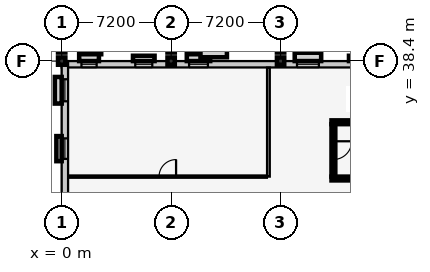
"""IFC4 building model, lengths in metres.
Left out: names, types, materials, properties, quantities, classifications, styles, units other than length and angle.
Written with IfcOpenShell. Run it as: python <this file> out.ifc"""

import sys

from ifc_helpers import new_model, si_unit, direction, frame, frame_2d, origin, origin_2d, place, context, subcontext, project, spatial, rectangle, extrude, element, fill, save


model = new_model("IFC4")
c1 = context("Model", 3, precision=1e-05, world=origin(), true_north=direction((0.0, 1.0)))
c2 = subcontext(c1, "Body", "Model", "MODEL_VIEW")
j1 = project(units=[si_unit("LENGTHUNIT", "METRE"), si_unit("PLANEANGLEUNIT", "RADIAN")], contexts=[c1])
p1 = place(None, origin())
s1 = spatial("IfcSite", under=j1, at=p1, CompositionType="ELEMENT")
p2 = place(p1, origin())
s2 = spatial("IfcBuilding", under=s1, at=p2, CompositionType="ELEMENT")
p3 = place(p2, frame((0.0, 0.0, 9.6)))
s3 = spatial("IfcBuildingStorey", under=s2, at=p3, CompositionType="ELEMENT", Elevation=9.6)
for number, where, z_axis, x_axis in (
    (1, (0.0, 38.4, 0.0), (0.0, 0.0, 1.0), (1.0, 0.0, 0.0)),
    (2, (7.2, 38.4, 0.0), (0.0, 0.0, 1.0), (1.0, 0.0, 0.0)),
    (3, (14.4, 38.4, 0.0), (0.0, 0.0, 1.0), (1.0, 0.0, 0.0)),
    (4, (0.0, 39.2, 0.0), (0.0, 0.0, 1.0), (1.0, 0.0, 0.0)),
    (5, (7.2, 39.2, 0.0), (0.0, 0.0, 1.0), (1.0, 0.0, 0.0)),
    (6, (14.4, 39.2, 0.0), (0.0, 0.0, 1.0), (1.0, 0.0, 0.0)),
):
    element("IfcColumn", number, at=place(p3, frame(where, z_axis=z_axis, x_axis=x_axis)), inside=s3, PredefinedType="COLUMN", context=c2, shape_type="SweptSolid", body=[
        extrude(rectangle(XDim=0.48, YDim=0.48, at=origin_2d()), origin(), (0.0, 0.0, 1.0), 4.2),
    ])
p4 = place(p3, frame((0.0, 38.19, 0.0), z_axis=(0.0, 0.0, 1.0), x_axis=(1.0, 0.0, 0.0)))
e7 = element("IfcWall", 7, at=p4, inside=s3, PredefinedType="SOLIDWALL", context=c2, shape_type="SweptSolid", body=[
    extrude(rectangle(XDim=57.6, YDim=0.42, at=frame_2d((28.8, 0.0))), origin(), (0.0, 0.0, 1.0), 3.675),
])
p5 = place(p4, frame((1.3, 0.0, 0.9)))
e8 = element("IfcOpeningElement", 8, at=p5, cuts=e7, PredefinedType="OPENING", context=c2, shape_type="SweptSolid", body=[
    extrude(rectangle(XDim=1.0, YDim=1.75, at=frame_2d((0.5, 0.875))), frame((0.0, 0.222, 0.0), z_axis=(0.0, -1.0, 0.0), x_axis=(1.0, 0.0, 0.0)), (0.0, 0.0, 1.0), 0.444),
])
p6 = place(p4, frame((4.84, 0.0, 0.9)))
e9 = element("IfcOpeningElement", 9, at=p6, cuts=e7, PredefinedType="OPENING", context=c2, shape_type="SweptSolid", body=[
    extrude(rectangle(XDim=1.12, YDim=1.75, at=frame_2d((0.56, 0.875))), frame((0.0, 0.222, 0.0), z_axis=(0.0, -1.0, 0.0), x_axis=(1.0, 0.0, 0.0)), (0.0, 0.0, 1.0), 0.444),
])
p7 = place(p4, frame((8.38, 0.0, 0.9)))
e10 = element("IfcOpeningElement", 10, at=p7, cuts=e7, PredefinedType="OPENING", context=c2, shape_type="SweptSolid", body=[
    extrude(rectangle(XDim=1.24, YDim=1.75, at=frame_2d((0.62, 0.875))), frame((0.0, 0.222, 0.0), z_axis=(0.0, -1.0, 0.0), x_axis=(1.0, 0.0, 0.0)), (0.0, 0.0, 1.0), 0.444),
])
p8 = place(p4, frame((15.48, 0.0, 0.9)))
e11 = element("IfcOpeningElement", 11, at=p8, cuts=e7, PredefinedType="OPENING", context=c2, shape_type="SweptSolid", body=[
    extrude(rectangle(XDim=1.44, YDim=1.75, at=frame_2d((0.72, 0.875))), frame((0.0, 0.222, 0.0), z_axis=(0.0, -1.0, 0.0), x_axis=(1.0, 0.0, 0.0)), (0.0, 0.0, 1.0), 0.444),
])
p9 = place(p4, frame((19.05, 0.0, 0.9)))
e12 = element("IfcOpeningElement", 12, at=p9, cuts=e7, PredefinedType="OPENING", context=c2, shape_type="SweptSolid", body=[
    extrude(rectangle(XDim=1.5, YDim=1.75, at=frame_2d((0.75, 0.875))), frame((0.0, 0.222, 0.0), z_axis=(0.0, -1.0, 0.0), x_axis=(1.0, 0.0, 0.0)), (0.0, 0.0, 1.0), 0.444),
])
p10 = place(p4, frame((22.95, 0.0, 0.9)))
e13 = element("IfcOpeningElement", 13, at=p10, cuts=e7, PredefinedType="OPENING", context=c2, shape_type="SweptSolid", body=[
    extrude(rectangle(XDim=0.9, YDim=1.35, at=frame_2d((0.45, 0.675))), frame((0.0, 0.222, 0.0), z_axis=(0.0, -1.0, 0.0), x_axis=(1.0, 0.0, 0.0)), (0.0, 0.0, 1.0), 0.444),
])
p11 = place(p4, frame((30.05, 0.0, 0.9)))
e14 = element("IfcOpeningElement", 14, at=p11, cuts=e7, PredefinedType="OPENING", context=c2, shape_type="SweptSolid", body=[
    extrude(rectangle(XDim=1.1, YDim=1.35, at=frame_2d((0.55, 0.675))), frame((0.0, 0.222, 0.0), z_axis=(0.0, -1.0, 0.0), x_axis=(1.0, 0.0, 0.0)), (0.0, 0.0, 1.0), 0.444),
])
p12 = place(p4, frame((33.6, 0.0, 0.9)))
e15 = element("IfcOpeningElement", 15, at=p12, cuts=e7, PredefinedType="OPENING", context=c2, shape_type="SweptSolid", body=[
    extrude(rectangle(XDim=1.2, YDim=1.35, at=frame_2d((0.6, 0.675))), frame((0.0, 0.222, 0.0), z_axis=(0.0, -1.0, 0.0), x_axis=(1.0, 0.0, 0.0)), (0.0, 0.0, 1.0), 0.444),
])
p13 = place(p4, frame((37.15, 0.0, 0.9)))
e16 = element("IfcOpeningElement", 16, at=p13, cuts=e7, PredefinedType="OPENING", context=c2, shape_type="SweptSolid", body=[
    extrude(rectangle(XDim=1.3, YDim=1.35, at=frame_2d((0.65, 0.675))), frame((0.0, 0.222, 0.0), z_axis=(0.0, -1.0, 0.0), x_axis=(1.0, 0.0, 0.0)), (0.0, 0.0, 1.0), 0.444),
])
p14 = place(p4, frame((40.7, 0.0, 0.9)))
e17 = element("IfcOpeningElement", 17, at=p14, cuts=e7, PredefinedType="OPENING", context=c2, shape_type="SweptSolid", body=[
    extrude(rectangle(XDim=1.4, YDim=1.35, at=frame_2d((0.7, 0.675))), frame((0.0, 0.222, 0.0), z_axis=(0.0, -1.0, 0.0), x_axis=(1.0, 0.0, 0.0)), (0.0, 0.0, 1.0), 0.444),
])
p15 = place(p4, frame((44.525, 0.0, 0.9)))
e18 = element("IfcOpeningElement", 18, at=p15, cuts=e7, PredefinedType="OPENING", context=c2, shape_type="SweptSolid", body=[
    extrude(rectangle(XDim=0.95, YDim=1.45, at=frame_2d((0.475, 0.725))), frame((0.0, 0.222, 0.0), z_axis=(0.0, -1.0, 0.0), x_axis=(1.0, 0.0, 0.0)), (0.0, 0.0, 1.0), 0.444),
])
p16 = place(p4, frame((51.625, 0.0, 0.9)))
e19 = element("IfcOpeningElement", 19, at=p16, cuts=e7, PredefinedType="OPENING", context=c2, shape_type="SweptSolid", body=[
    extrude(rectangle(XDim=1.15, YDim=1.45, at=frame_2d((0.575, 0.725))), frame((0.0, 0.222, 0.0), z_axis=(0.0, -1.0, 0.0), x_axis=(1.0, 0.0, 0.0)), (0.0, 0.0, 1.0), 0.444),
])
p17 = place(p4, frame((55.175, 0.0, 0.9)))
e20 = element("IfcOpeningElement", 20, at=p17, cuts=e7, PredefinedType="OPENING", context=c2, shape_type="SweptSolid", body=[
    extrude(rectangle(XDim=1.25, YDim=1.45, at=frame_2d((0.625, 0.725))), frame((0.0, 0.222, 0.0), z_axis=(0.0, -1.0, 0.0), x_axis=(1.0, 0.0, 0.0)), (0.0, 0.0, 1.0), 0.444),
])
p18 = place(p3, frame((0.21, 0.0, 0.0), z_axis=(0.0, 0.0, 1.0), x_axis=(0.0, 1.0, 0.0)))
e21 = element("IfcWall", 21, at=p18, inside=s3, PredefinedType="SOLIDWALL", context=c2, shape_type="SweptSolid", body=[
    extrude(rectangle(XDim=38.4, YDim=0.42, at=frame_2d((19.2, 0.0))), origin(), (0.0, 0.0, 1.0), 3.825),
])
p19 = place(p18, frame((31.965, 0.0, 0.9)))
e22 = element("IfcOpeningElement", 22, at=p19, cuts=e21, PredefinedType="OPENING", context=c2, shape_type="SweptSolid", body=[
    extrude(rectangle(XDim=1.35, YDim=1.45, at=frame_2d((0.675, 0.725))), frame((0.0, 0.222, 0.0), z_axis=(0.0, -1.0, 0.0), x_axis=(1.0, 0.0, 0.0)), (0.0, 0.0, 1.0), 0.444),
])
p20 = place(p18, frame((35.755, 0.0, 0.9)))
e23 = element("IfcOpeningElement", 23, at=p20, cuts=e21, PredefinedType="OPENING", context=c2, shape_type="SweptSolid", body=[
    extrude(rectangle(XDim=1.45, YDim=1.45, at=frame_2d((0.725, 0.725))), frame((0.0, 0.222, 0.0), z_axis=(0.0, -1.0, 0.0), x_axis=(1.0, 0.0, 0.0)), (0.0, 0.0, 1.0), 0.444),
])
for number, where, z_axis, x_axis in (
    (24, (17.75, 30.675, 0.0), (0.0, 0.0, 1.0), (1.0, 0.0, 0.0)),
    (25, (26.65, 34.375, 0.0), (0.0, 0.0, 1.0), (-1.0, 0.0, 0.0)),
):
    element("IfcWall", number, at=place(p3, frame(where, z_axis=z_axis, x_axis=x_axis)), inside=s3, PredefinedType="SHEAR", context=c2, shape_type="SweptSolid", body=[
        extrude(rectangle(XDim=8.9, YDim=0.25, at=frame_2d((4.45, 0.0))), origin(), (0.0, 0.0, 1.0), 3.95),
    ])
p21 = place(p3, frame((17.875, 34.25, 0.0), z_axis=(0.0, 0.0, 1.0), x_axis=(0.0, -1.0, 0.0)))
e26 = element("IfcWall", 26, at=p21, inside=s3, PredefinedType="SHEAR", context=c2, shape_type="SweptSolid", body=[
    extrude(rectangle(XDim=3.45, YDim=0.25, at=frame_2d((1.725, 0.0))), origin(), (0.0, 0.0, 1.0), 3.95),
])
p22 = place(p21, frame((1.125, 0.0, 0.0)))
e27 = element("IfcOpeningElement", 27, at=p22, cuts=e26, PredefinedType="OPENING", context=c2, shape_type="SweptSolid", body=[
    extrude(rectangle(XDim=1.2, YDim=2.15, at=frame_2d((0.6, 1.075))), frame((0.0, 0.137, 0.0), z_axis=(0.0, -1.0, 0.0), x_axis=(1.0, 0.0, 0.0)), (0.0, 0.0, 1.0), 0.274),
])
p23 = place(p3, frame((13.6, 30.8, 0.0), z_axis=(0.0, 0.0, 1.0), x_axis=(0.0, 1.0, 0.0)))
e28 = element("IfcWall", 28, at=p23, inside=s3, PredefinedType="PARTITIONING", context=c2, shape_type="SweptSolid", body=[
    extrude(rectangle(XDim=7.17, YDim=0.18, at=frame_2d((3.585, 0.0))), origin(), (0.0, 0.0, 1.0), 3.95),
])
p24 = place(p3, frame((0.43, 30.8, 0.0), z_axis=(0.0, 0.0, 1.0), x_axis=(1.0, 0.0, 0.0)))
e29 = element("IfcWall", 29, at=p24, inside=s3, PredefinedType="PARTITIONING", context=c2, shape_type="SweptSolid", body=[
    extrude(rectangle(XDim=13.07, YDim=0.15, at=frame_2d((6.535, 0.0))), origin(), (0.0, 0.0, 1.0), 3.95),
])
p25 = place(p24, frame((5.975, 0.0, 0.0)))
e30 = element("IfcOpeningElement", 30, at=p25, cuts=e29, PredefinedType="OPENING", context=c2, shape_type="SweptSolid", body=[
    extrude(rectangle(XDim=1.12, YDim=2.15, at=frame_2d((0.56, 1.075))), frame((0.0, 0.087, 0.0), z_axis=(0.0, -1.0, 0.0), x_axis=(1.0, 0.0, 0.0)), (0.0, 0.0, 1.0), 0.174),
])
p26 = place(p5, origin())
e31 = element("IfcWindow", 31, at=p26, inside=s3, PartitioningType="SINGLE_PANEL", PredefinedType="WINDOW", context=c2, shape_type="SweptSolid", body=[
    extrude(rectangle(XDim=1.0, YDim=1.75, at=frame_2d((0.5, 0.875))), frame((0.0, 0.03, 0.0), z_axis=(0.0, -1.0, 0.0), x_axis=(1.0, 0.0, 0.0)), (0.0, 0.0, 1.0), 0.06),
])
fill(e8, e31)
p27 = place(p6, origin())
e32 = element("IfcWindow", 32, at=p27, inside=s3, PartitioningType="SINGLE_PANEL", PredefinedType="WINDOW", context=c2, shape_type="SweptSolid", body=[
    extrude(rectangle(XDim=1.12, YDim=1.75, at=frame_2d((0.56, 0.875))), frame((0.0, 0.03, 0.0), z_axis=(0.0, -1.0, 0.0), x_axis=(1.0, 0.0, 0.0)), (0.0, 0.0, 1.0), 0.06),
])
fill(e9, e32)
p28 = place(p7, origin())
e33 = element("IfcWindow", 33, at=p28, inside=s3, PartitioningType="SINGLE_PANEL", PredefinedType="WINDOW", context=c2, shape_type="SweptSolid", body=[
    extrude(rectangle(XDim=1.24, YDim=1.75, at=frame_2d((0.62, 0.875))), frame((0.0, 0.03, 0.0), z_axis=(0.0, -1.0, 0.0), x_axis=(1.0, 0.0, 0.0)), (0.0, 0.0, 1.0), 0.06),
])
fill(e10, e33)
p29 = place(p8, origin())
e34 = element("IfcWindow", 34, at=p29, inside=s3, PartitioningType="SINGLE_PANEL", PredefinedType="WINDOW", context=c2, shape_type="SweptSolid", body=[
    extrude(rectangle(XDim=1.44, YDim=1.75, at=frame_2d((0.72, 0.875))), frame((0.0, 0.03, 0.0), z_axis=(0.0, -1.0, 0.0), x_axis=(1.0, 0.0, 0.0)), (0.0, 0.0, 1.0), 0.06),
])
fill(e11, e34)
p30 = place(p19, origin())
e35 = element("IfcWindow", 35, at=p30, inside=s3, PartitioningType="SINGLE_PANEL", PredefinedType="WINDOW", context=c2, shape_type="SweptSolid", body=[
    extrude(rectangle(XDim=1.35, YDim=1.45, at=frame_2d((0.675, 0.725))), frame((0.0, 0.03, 0.0), z_axis=(0.0, -1.0, 0.0), x_axis=(1.0, 0.0, 0.0)), (0.0, 0.0, 1.0), 0.06),
])
fill(e22, e35)
p31 = place(p20, origin())
e36 = element("IfcWindow", 36, at=p31, inside=s3, PartitioningType="SINGLE_PANEL", PredefinedType="WINDOW", context=c2, shape_type="SweptSolid", body=[
    extrude(rectangle(XDim=1.45, YDim=1.45, at=frame_2d((0.725, 0.725))), frame((0.0, 0.03, 0.0), z_axis=(0.0, -1.0, 0.0), x_axis=(1.0, 0.0, 0.0)), (0.0, 0.0, 1.0), 0.06),
])
fill(e23, e36)
p32 = place(p22, origin())
e37 = element("IfcDoor", 37, at=p32, inside=s3, OperationType="SINGLE_SWING_LEFT", PredefinedType="DOOR", context=c2, shape_type="SweptSolid", body=[
    extrude(rectangle(XDim=1.2, YDim=2.15, at=frame_2d((0.6, 1.075))), frame((0.0, 0.025, 0.0), z_axis=(0.0, -1.0, 0.0), x_axis=(1.0, 0.0, 0.0)), (0.0, 0.0, 1.0), 0.05),
])
fill(e27, e37)
p33 = place(p25, origin())
e38 = element("IfcDoor", 38, at=p33, inside=s3, OperationType="SINGLE_SWING_RIGHT", PredefinedType="DOOR", context=c2, shape_type="SweptSolid", body=[
    extrude(rectangle(XDim=1.12, YDim=2.15, at=frame_2d((0.56, 1.075))), frame((0.0, 0.025, 0.0), z_axis=(0.0, -1.0, 0.0), x_axis=(1.0, 0.0, 0.0)), (0.0, 0.0, 1.0), 0.05),
])
fill(e30, e38)
save(model, sys.argv[1])
